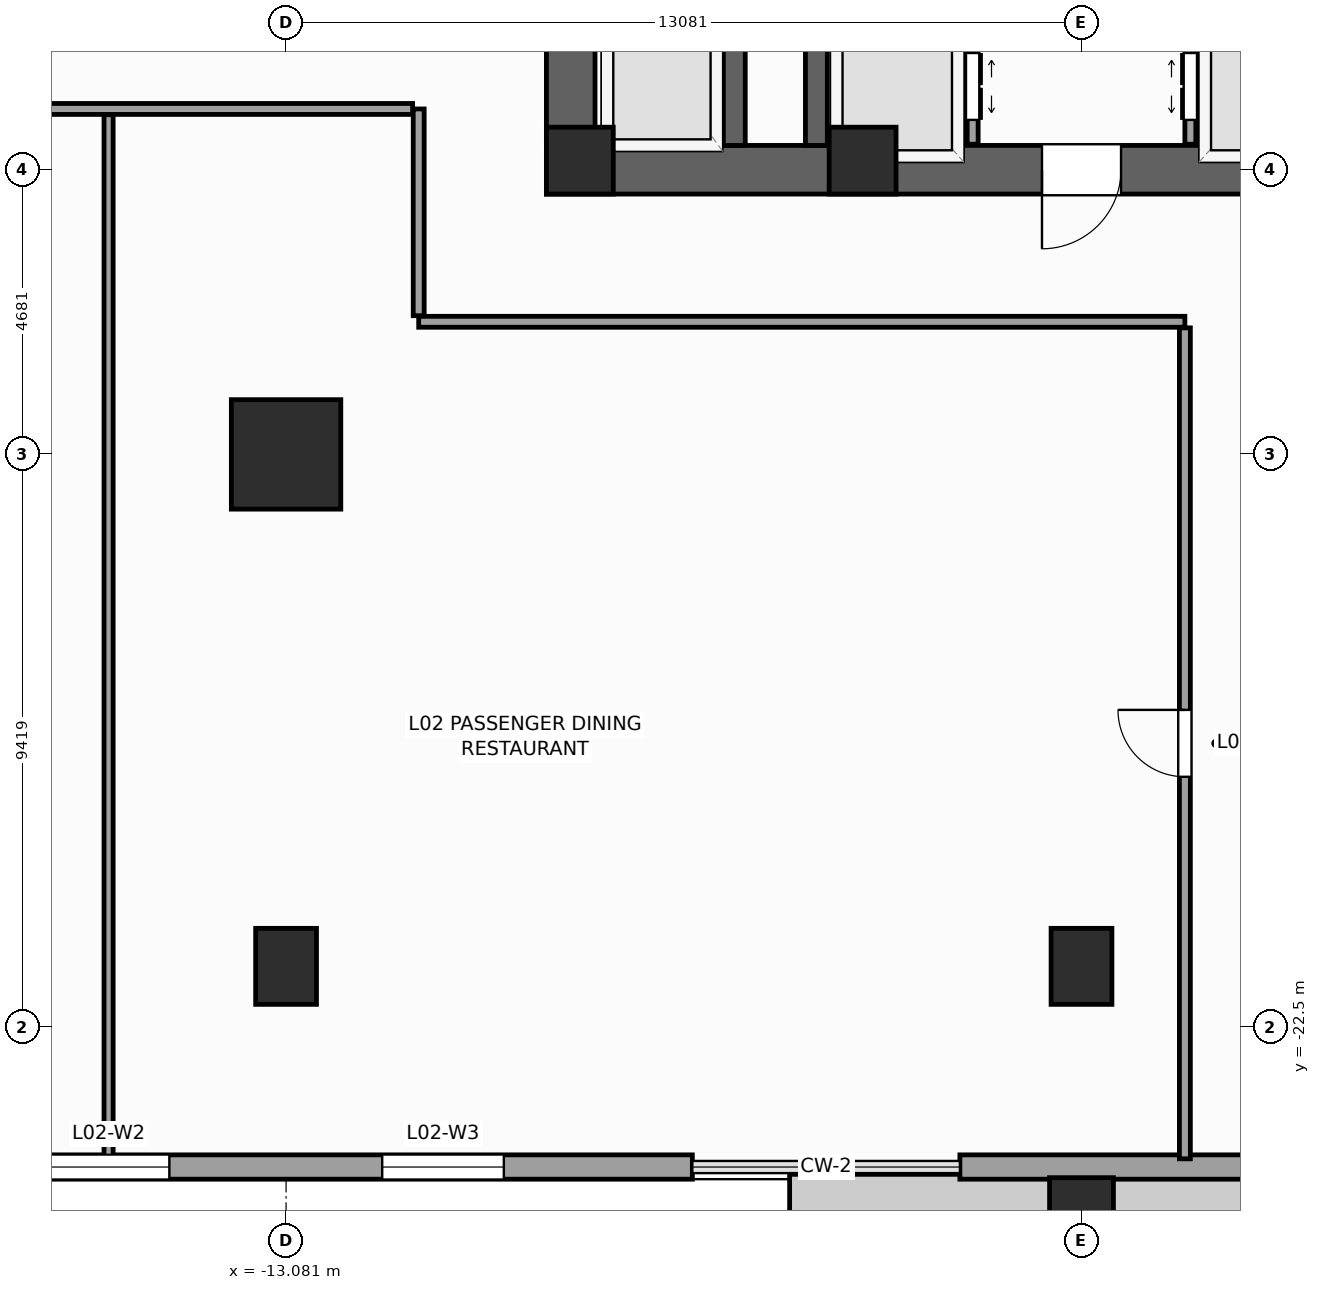
"""IFC4 building model, lengths in metres.
Left out: names, types, materials, properties, quantities, classifications, styles, units other than length and angle.
Written with IfcOpenShell. Run it as: python <this file> out.ifc"""

import sys

from ifc_helpers import new_model, si_unit, direction, frame, frame_2d, origin, origin_2d, place, context, subcontext, project, spatial, rectangle, extrude, source, transform, mapped, element, fill, save


model = new_model("IFC4")
c1 = context("Model", 3, precision=1e-05, world=origin(), true_north=direction((0.0, 1.0)))
c2 = subcontext(c1, "Body", "Model", "MODEL_VIEW")
j1 = project(units=[si_unit("LENGTHUNIT", "METRE"), si_unit("PLANEANGLEUNIT", "RADIAN")], contexts=[c1])
p1 = place(None, origin())
s1 = spatial("IfcSite", under=j1, at=p1, CompositionType="ELEMENT")
p2 = place(p1, origin())
s2 = spatial("IfcBuilding", under=s1, at=p2, CompositionType="ELEMENT")
p3 = place(p2, frame((0.0, 0.0, 11.0)))
s3 = spatial("IfcBuildingStorey", under=s2, at=p3, CompositionType="ELEMENT", Elevation=11.0)
p4 = place(p3, frame((-8.8, -8.4, 0.0), z_axis=(0.0, 0.0, 1.0), x_axis=(1.0, 0.0, 0.0)))
e1 = element("IfcWall", 1, at=p4, inside=s3, PredefinedType="SHEAR", context=c2, shape_type="SweptSolid", body=[
    extrude(rectangle(XDim=17.6, YDim=0.8, at=frame_2d((8.8, 0.0))), origin(), (0.0, 0.0, 1.0), 5.0),
])
p5 = place(p4, frame((8.15, 0.0, 0.0)))
e2 = element("IfcOpeningElement", 2, at=p5, cuts=e1, PredefinedType="OPENING", context=c2, shape_type="SweptSolid", body=[
    extrude(rectangle(XDim=1.3, YDim=2.2, at=frame_2d((0.65, 1.1))), frame((0.0, 0.41, 0.0), z_axis=(0.0, -1.0, 0.0), x_axis=(1.0, 0.0, 0.0)), (0.0, 0.0, 1.0), 0.82),
])
p6 = place(p3, frame((-8.4, -8.0, 0.0), z_axis=(0.0, 0.0, 1.0), x_axis=(0.0, 1.0, 0.0)))
e3 = element("IfcWall", 3, at=p6, inside=s3, PredefinedType="SHEAR", context=c2, shape_type="SweptSolid", body=[
    extrude(rectangle(XDim=16.0, YDim=0.8, at=frame_2d((8.0, 0.0))), origin(), (0.0, 0.0, 1.0), 5.0),
])
p7 = place(p6, frame((4.69, 0.0, 0.0)))
e4 = element("IfcOpeningElement", 4, at=p7, cuts=e3, PredefinedType="OPENING", context=c2, shape_type="SweptSolid", body=[
    extrude(rectangle(XDim=1.3, YDim=2.2, at=frame_2d((0.65, 1.1))), frame((0.0, 0.41, 0.0), z_axis=(0.0, -1.0, 0.0), x_axis=(1.0, 0.0, 0.0)), (0.0, 0.0, 1.0), 0.82),
])
p8 = place(p3, frame((-4.36, -8.0, 0.0), z_axis=(0.0, 0.0, 1.0), x_axis=(0.0, 1.0, 0.0)))
e5 = element("IfcWall", 5, at=p8, inside=s3, PredefinedType="SHEAR", context=c2, shape_type="SweptSolid", body=[
    extrude(rectangle(XDim=16.0, YDim=0.36, at=frame_2d((8.0, 0.0))), origin(), (0.0, 0.0, 1.0), 5.0),
])
p9 = place(p3, frame((-5.71, -8.0, 0.0), z_axis=(0.0, 0.0, 1.0), x_axis=(0.0, 1.0, 0.0)))
e6 = element("IfcWall", 6, at=p9, inside=s3, PredefinedType="SHEAR", context=c2, shape_type="SweptSolid", body=[
    extrude(rectangle(XDim=2.54, YDim=0.36, at=frame_2d((1.27, 0.0))), origin(), (0.0, 0.0, 1.0), 5.0),
])
m1 = source(origin(), c2, "Body", "SweptSolid", [
    extrude(rectangle(XDim=1.1, YDim=1.1, at=origin_2d()), origin(), (0.0, 0.0, 1.0), 5.0),
])
for number, where, z_axis, x_axis in (
    (7, (-8.25, -8.25, 0.0), (0.0, 0.0, 1.0), (1.0, 0.0, 0.0)),
    (8, (-3.6, -8.25, 0.0), (0.0, 0.0, 1.0), (1.0, 0.0, 0.0)),
):
    element("IfcColumn", number, at=place(p3, frame(where, z_axis=z_axis, x_axis=x_axis)), inside=s3, PredefinedType="PILASTER", context=c2, shape_type="MappedRepresentation", body=[
        mapped(m1, transform((0.0, 0.0, 0.0), scale=1.0)),
    ])
m2 = source(origin(), c2, "Body", "SweptSolid", [
    extrude(rectangle(XDim=1.8, YDim=1.8, at=origin_2d()), origin(), (0.0, 0.0, 1.0), 5.0),
])
p10 = place(p3, frame((-13.081, -13.081, 0.0), z_axis=(0.0, 0.0, 1.0), x_axis=(1.0, 0.0, 0.0)))
e9 = element("IfcColumn", 9, at=p10, inside=s3, PredefinedType="COLUMN", context=c2, shape_type="MappedRepresentation", body=[
    mapped(m2, transform((0.0, 0.0, 0.0), scale=1.0)),
])
m3 = source(origin(), c2, "Body", "SweptSolid", [
    extrude(rectangle(XDim=1.0, YDim=1.25, at=origin_2d()), origin(), (0.0, 0.0, 1.0), 5.0),
])
for number, where, z_axis, x_axis in (
    (10, (-13.081, -21.5, 0.0), (0.0, 0.0, 1.0), (1.0, 0.0, 0.0)),
    (11, (0.0, -21.5, 0.0), (0.0, 0.0, 1.0), (1.0, 0.0, 0.0)),
):
    element("IfcColumn", number, at=place(p3, frame(where, z_axis=z_axis, x_axis=x_axis)), inside=s3, PredefinedType="COLUMN", context=c2, shape_type="MappedRepresentation", body=[
        mapped(m3, transform((0.0, 0.0, 0.0), scale=1.0)),
    ])
m4 = source(origin(), c2, "Body", "SweptSolid", [
    extrude(rectangle(XDim=1.05, YDim=1.05, at=origin_2d()), origin(), (0.0, 0.0, 1.0), 5.0),
])
p11 = place(p3, frame((0.0, -25.5, 0.0), z_axis=(0.0, 0.0, 1.0), x_axis=(1.0, 0.0, 0.0)))
e12 = element("IfcColumn", 12, at=p11, inside=s3, PredefinedType="COLUMN", context=c2, shape_type="MappedRepresentation", body=[
    mapped(m4, transform((0.0, 0.0, 0.0), scale=1.0)),
])
p12 = place(p3, frame((-36.0, -24.8, 0.0), z_axis=(0.0, 0.0, 1.0), x_axis=(1.0, 0.0, 0.0)))
e13 = element("IfcWall", 13, at=p12, inside=s3, PredefinedType="STANDARD", context=c2, shape_type="SweptSolid", body=[
    extrude(rectangle(XDim=29.6, YDim=0.4, at=frame_2d((14.8, 0.0))), origin(), (0.0, 0.0, 1.0), 4.66),
])
p13 = place(p12, frame((14.0, 0.0, 0.85)))
e14 = element("IfcOpeningElement", 14, at=p13, cuts=e13, PredefinedType="OPENING", context=c2, shape_type="SweptSolid", body=[
    extrude(rectangle(XDim=2.0, YDim=2.8, at=frame_2d((1.0, 1.4))), frame((0.0, 0.21, 0.0), z_axis=(0.0, -1.0, 0.0), x_axis=(1.0, 0.0, 0.0)), (0.0, 0.0, 1.0), 0.42),
])
p14 = place(p12, frame((19.0, 0.0, 0.85)))
e15 = element("IfcOpeningElement", 15, at=p14, cuts=e13, PredefinedType="OPENING", context=c2, shape_type="SweptSolid", body=[
    extrude(rectangle(XDim=2.0, YDim=2.8, at=frame_2d((1.0, 1.4))), frame((0.0, 0.21, 0.0), z_axis=(0.0, -1.0, 0.0), x_axis=(1.0, 0.0, 0.0)), (0.0, 0.0, 1.0), 0.42),
])
p15 = place(p12, frame((24.5, 0.0, 0.85)))
e16 = element("IfcOpeningElement", 16, at=p15, cuts=e13, PredefinedType="OPENING", context=c2, shape_type="SweptSolid", body=[
    extrude(rectangle(XDim=2.0, YDim=2.8, at=frame_2d((1.0, 1.4))), frame((0.0, 0.21, 0.0), z_axis=(0.0, -1.0, 0.0), x_axis=(1.0, 0.0, 0.0)), (0.0, 0.0, 1.0), 0.42),
])
p16 = place(p3, frame((-2.0, -24.8, 0.0), z_axis=(0.0, 0.0, 1.0), x_axis=(1.0, 0.0, 0.0)))
e17 = element("IfcWall", 17, at=p16, inside=s3, PredefinedType="STANDARD", context=c2, shape_type="SweptSolid", body=[
    extrude(rectangle(XDim=38.0, YDim=0.4, at=frame_2d((19.0, 0.0))), origin(), (0.0, 0.0, 1.0), 4.66),
])
p17 = place(p16, frame((11.5, 0.0, 0.85)))
e18 = element("IfcOpeningElement", 18, at=p17, cuts=e17, PredefinedType="OPENING", context=c2, shape_type="SweptSolid", body=[
    extrude(rectangle(XDim=2.0, YDim=2.8, at=frame_2d((1.0, 1.4))), frame((0.0, 0.21, 0.0), z_axis=(0.0, -1.0, 0.0), x_axis=(1.0, 0.0, 0.0)), (0.0, 0.0, 1.0), 0.42),
])
p18 = place(p16, frame((17.0, 0.0, 0.85)))
e19 = element("IfcOpeningElement", 19, at=p18, cuts=e17, PredefinedType="OPENING", context=c2, shape_type="SweptSolid", body=[
    extrude(rectangle(XDim=2.0, YDim=2.8, at=frame_2d((1.0, 1.4))), frame((0.0, 0.21, 0.0), z_axis=(0.0, -1.0, 0.0), x_axis=(1.0, 0.0, 0.0)), (0.0, 0.0, 1.0), 0.42),
])
p19 = place(p16, frame((22.0, 0.0, 0.85)))
e20 = element("IfcOpeningElement", 20, at=p19, cuts=e17, PredefinedType="OPENING", context=c2, shape_type="SweptSolid", body=[
    extrude(rectangle(XDim=2.0, YDim=2.8, at=frame_2d((1.0, 1.4))), frame((0.0, 0.21, 0.0), z_axis=(0.0, -1.0, 0.0), x_axis=(1.0, 0.0, 0.0)), (0.0, 0.0, 1.0), 0.42),
])
p20 = place(p3, frame((-1.79, -7.98, 0.0), z_axis=(0.0, 0.0, 1.0), x_axis=(0.0, 1.0, 0.0)))
e21 = element("IfcWall", 21, at=p20, inside=s3, PredefinedType="PARTITIONING", context=c2, shape_type="SweptSolid", body=[
    extrude(rectangle(XDim=12.38, YDim=0.18, at=frame_2d((6.19, 0.0))), origin(), (0.0, 0.0, 1.0), 4.66),
])
p21 = place(p20, frame((0.4, 0.0, 0.0)))
e22 = element("IfcOpeningElement", 22, at=p21, cuts=e21, PredefinedType="OPENING", context=c2, shape_type="SweptSolid", body=[
    extrude(rectangle(XDim=1.1, YDim=2.2, at=frame_2d((0.55, 1.1))), frame((0.0, 0.1, 0.0), z_axis=(0.0, -1.0, 0.0), x_axis=(1.0, 0.0, 0.0)), (0.0, 0.0, 1.0), 0.2),
])
p22 = place(p20, frame((2.46, 0.0, 0.0)))
e23 = element("IfcOpeningElement", 23, at=p22, cuts=e21, PredefinedType="OPENING", context=c2, shape_type="SweptSolid", body=[
    extrude(rectangle(XDim=1.1, YDim=2.2, at=frame_2d((0.55, 1.1))), frame((0.0, 0.1, 0.0), z_axis=(0.0, -1.0, 0.0), x_axis=(1.0, 0.0, 0.0)), (0.0, 0.0, 1.0), 0.2),
])
p23 = place(p3, frame((1.79, -7.98, 0.0), z_axis=(0.0, 0.0, 1.0), x_axis=(0.0, 1.0, 0.0)))
e24 = element("IfcWall", 24, at=p23, inside=s3, PredefinedType="PARTITIONING", context=c2, shape_type="SweptSolid", body=[
    extrude(rectangle(XDim=12.38, YDim=0.18, at=frame_2d((6.19, 0.0))), origin(), (0.0, 0.0, 1.0), 4.66),
])
p24 = place(p23, frame((0.4, 0.0, 0.0)))
e25 = element("IfcOpeningElement", 25, at=p24, cuts=e24, PredefinedType="OPENING", context=c2, shape_type="SweptSolid", body=[
    extrude(rectangle(XDim=1.1, YDim=2.2, at=frame_2d((0.55, 1.1))), frame((0.0, 0.1, 0.0), z_axis=(0.0, -1.0, 0.0), x_axis=(1.0, 0.0, 0.0)), (0.0, 0.0, 1.0), 0.2),
])
p25 = place(p23, frame((2.46, 0.0, 0.0)))
e26 = element("IfcOpeningElement", 26, at=p25, cuts=e24, PredefinedType="OPENING", context=c2, shape_type="SweptSolid", body=[
    extrude(rectangle(XDim=1.1, YDim=2.2, at=frame_2d((0.55, 1.1))), frame((0.0, 0.1, 0.0), z_axis=(0.0, -1.0, 0.0), x_axis=(1.0, 0.0, 0.0)), (0.0, 0.0, 1.0), 0.2),
])
p26 = place(p3, frame((-10.9, -10.9, 0.0), z_axis=(0.0, 0.0, 1.0), x_axis=(1.0, 0.0, 0.0)))
e27 = element("IfcWall", 27, at=p26, inside=s3, PredefinedType="PARTITIONING", context=c2, shape_type="SweptSolid", body=[
    extrude(rectangle(XDim=12.6, YDim=0.18, at=frame_2d((6.3, 0.0))), origin(), (0.0, 0.0, 1.0), 4.66),
])
p27 = place(p3, frame((-10.9, -10.8, 0.0), z_axis=(0.0, 0.0, 1.0), x_axis=(0.0, 1.0, 0.0)))
e28 = element("IfcWall", 28, at=p27, inside=s3, PredefinedType="PARTITIONING", context=c2, shape_type="SweptSolid", body=[
    extrude(rectangle(XDim=3.4, YDim=0.18, at=frame_2d((1.7, 0.0))), origin(), (0.0, 0.0, 1.0), 4.66),
])
p28 = place(p3, frame((-35.665, -7.4, 0.0), z_axis=(0.0, 0.0, 1.0), x_axis=(1.0, 0.0, 0.0)))
e29 = element("IfcWall", 29, at=p28, inside=s3, PredefinedType="PARTITIONING", context=c2, shape_type="SweptSolid", body=[
    extrude(rectangle(XDim=24.665, YDim=0.18, at=frame_2d((12.333, 0.0))), origin(), (0.0, 0.0, 1.0), 4.66),
])
p29 = place(p28, frame((1.455, 0.0, 0.0)))
e30 = element("IfcOpeningElement", 30, at=p29, cuts=e29, PredefinedType="OPENING", context=c2, shape_type="SweptSolid", body=[
    extrude(rectangle(XDim=0.95, YDim=2.1, at=frame_2d((0.475, 1.05))), frame((0.0, 0.1, 0.0), z_axis=(0.0, -1.0, 0.0), x_axis=(1.0, 0.0, 0.0)), (0.0, 0.0, 1.0), 0.2),
])
p30 = place(p28, frame((10.741, 0.0, 0.0)))
e31 = element("IfcOpeningElement", 31, at=p30, cuts=e29, PredefinedType="OPENING", context=c2, shape_type="SweptSolid", body=[
    extrude(rectangle(XDim=1.1, YDim=2.2, at=frame_2d((0.55, 1.1))), frame((0.0, 0.1, 0.0), z_axis=(0.0, -1.0, 0.0), x_axis=(1.0, 0.0, 0.0)), (0.0, 0.0, 1.0), 0.2),
])
p31 = place(p3, frame((1.7, -24.665, 0.0), z_axis=(0.0, 0.0, 1.0), x_axis=(0.0, 1.0, 0.0)))
e32 = element("IfcWall", 32, at=p31, inside=s3, PredefinedType="PARTITIONING", context=c2, shape_type="SweptSolid", body=[
    extrude(rectangle(XDim=13.665, YDim=0.18, at=frame_2d((6.833, 0.0))), origin(), (0.0, 0.0, 1.0), 4.66),
])
p32 = place(p31, frame((6.282, 0.0, 0.0)))
e33 = element("IfcOpeningElement", 33, at=p32, cuts=e32, PredefinedType="OPENING", context=c2, shape_type="SweptSolid", body=[
    extrude(rectangle(XDim=1.1, YDim=2.2, at=frame_2d((0.55, 1.1))), frame((0.0, 0.1, 0.0), z_axis=(0.0, -1.0, 0.0), x_axis=(1.0, 0.0, 0.0)), (0.0, 0.0, 1.0), 0.2),
])
p33 = place(p3, frame((-16.0, -24.665, 0.0), z_axis=(0.0, 0.0, 1.0), x_axis=(0.0, 1.0, 0.0)))
e34 = element("IfcWall", 34, at=p33, inside=s3, PredefinedType="PARTITIONING", context=c2, shape_type="SweptSolid", body=[
    extrude(rectangle(XDim=17.17, YDim=0.15, at=frame_2d((8.585, 0.0))), origin(), (0.0, 0.0, 1.0), 4.66),
])
m5 = source(origin(), c2, "Body", "SweptSolid", [
    extrude(rectangle(XDim=2.0, YDim=2.8, at=frame_2d((1.0, 1.4))), frame((0.0, 0.03, 0.0), z_axis=(0.0, -1.0, 0.0), x_axis=(1.0, 0.0, 0.0)), (0.0, 0.0, 1.0), 0.06),
])
p34 = place(p14, origin())
e35 = element("IfcWindow", 35, at=p34, inside=s3, PartitioningType="SINGLE_PANEL", PredefinedType="WINDOW", context=c2, shape_type="MappedRepresentation", body=[
    mapped(m5, transform((0.0, 0.0, 0.0), scale=1.0)),
])
fill(e15, e35)
p35 = place(p15, origin())
e36 = element("IfcWindow", 36, at=p35, inside=s3, PartitioningType="SINGLE_PANEL", PredefinedType="WINDOW", context=c2, shape_type="MappedRepresentation", body=[
    mapped(m5, transform((0.0, 0.0, 0.0), scale=1.0)),
])
fill(e16, e36)
m6 = source(origin(), c2, "Body", "SweptSolid", [
    extrude(rectangle(XDim=1.3, YDim=2.2, at=frame_2d((0.65, 1.1))), frame((0.0, 0.025, 0.0), z_axis=(0.0, -1.0, 0.0), x_axis=(1.0, 0.0, 0.0)), (0.0, 0.0, 1.0), 0.05),
])
p36 = place(p5, frame((1.3, 0.0, 0.0), z_axis=(0.0, 0.0, 1.0), x_axis=(-1.0, 0.0, 0.0)))
e37 = element("IfcDoor", 37, at=p36, inside=s3, OperationType="SINGLE_SWING_LEFT", PredefinedType="DOOR", context=c2, shape_type="MappedRepresentation", body=[
    mapped(m6, transform((0.0, 0.0, 0.0), scale=1.0)),
])
fill(e2, e37)
m7 = source(origin(), c2, "Body", "SweptSolid", [
    extrude(rectangle(XDim=1.1, YDim=2.2, at=frame_2d((0.55, 1.1))), frame((0.0, 0.025, 0.0), z_axis=(0.0, -1.0, 0.0), x_axis=(1.0, 0.0, 0.0)), (0.0, 0.0, 1.0), 0.05),
])
p37 = place(p21, frame((1.1, 0.0, 0.0), z_axis=(0.0, 0.0, 1.0), x_axis=(-1.0, 0.0, 0.0)))
e38 = element("IfcDoor", 38, at=p37, inside=s3, OperationType="DOUBLE_DOOR_SLIDING", PredefinedType="DOOR", context=c2, shape_type="MappedRepresentation", body=[
    mapped(m7, transform((0.0, 0.0, 0.0), scale=1.0)),
])
fill(e22, e38)
p38 = place(p24, origin())
e39 = element("IfcDoor", 39, at=p38, inside=s3, OperationType="DOUBLE_DOOR_SLIDING", PredefinedType="DOOR", context=c2, shape_type="MappedRepresentation", body=[
    mapped(m7, transform((0.0, 0.0, 0.0), scale=1.0)),
])
fill(e25, e39)
p39 = place(p32, origin())
e40 = element("IfcDoor", 40, at=p39, inside=s3, OperationType="SINGLE_SWING_RIGHT", PredefinedType="DOOR", context=c2, shape_type="MappedRepresentation", body=[
    mapped(m7, transform((0.0, 0.0, 0.0), scale=1.0)),
])
fill(e33, e40)
save(model, sys.argv[1])
